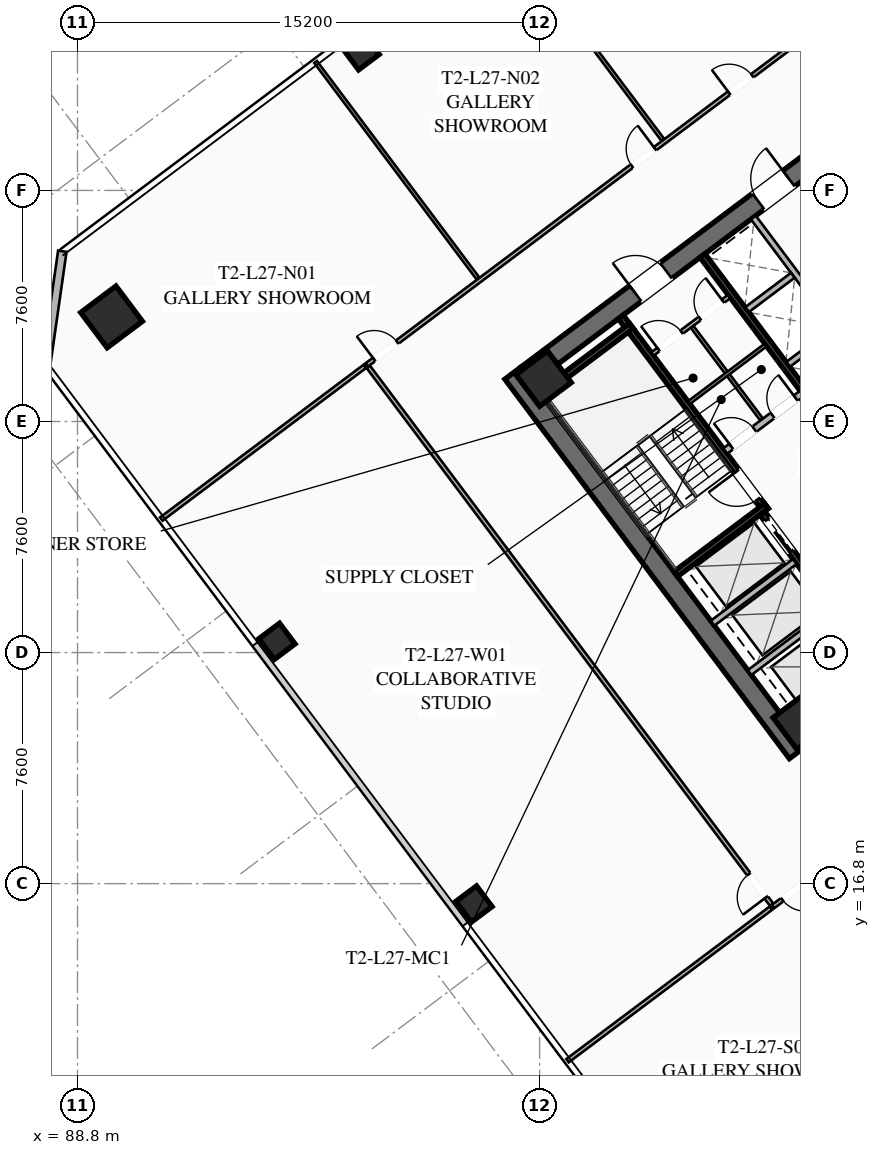
"""IFC4 building model, lengths in metres.
Left out: names, types, materials, properties, quantities, classifications, styles, units other than length and angle.
Written with IfcOpenShell. Run it as: python <this file> out.ifc"""

import sys

from ifc_helpers import new_model, si_unit, direction, frame, frame_2d, origin, origin_2d, place, context, subcontext, project, spatial, rectangle, hollow_rectangle, extrude, element, fill, save


model = new_model("IFC4")
c1 = context("Model", 3, precision=1e-05, world=origin(), true_north=direction((0.0, 1.0)))
c2 = subcontext(c1, "Body", "Model", "MODEL_VIEW")
j1 = project(units=[si_unit("LENGTHUNIT", "METRE"), si_unit("PLANEANGLEUNIT", "RADIAN")], contexts=[c1])
p1 = place(None, origin())
s1 = spatial("IfcSite", under=j1, at=p1, CompositionType="ELEMENT")
p2 = place(p1, origin())
s2 = spatial("IfcBuilding", under=s1, at=p2, CompositionType="ELEMENT")
p3 = place(p2, frame((0.0, 0.0, 102.7)))
s3 = spatial("IfcBuildingStorey", under=s2, at=p3, CompositionType="ELEMENT", Elevation=102.7)
p4 = place(p3, frame((112.476, 21.107, 0.0), z_axis=(0.0, 0.0, 1.0), x_axis=(-0.600005007985, 0.799996243986, 0.0)))
e1 = element("IfcWall", 1, at=p4, inside=s3, PredefinedType="SHEAR", context=c2, shape_type="SweptSolid", body=[
    extrude(rectangle(XDim=15.6, YDim=0.65, at=frame_2d((7.8, 0.0))), origin(), (0.0, 0.0, 1.0), 3.55),
])
p5 = place(p3, frame((124.429, 30.478, 0.0), z_axis=(0.0, 0.0, 1.0), x_axis=(-0.799998028465, -0.600002628705, 0.0)))
e2 = element("IfcWall", 2, at=p5, inside=s3, PredefinedType="SHEAR", context=c2, shape_type="SweptSolid", body=[
    extrude(rectangle(XDim=14.86, YDim=0.65, at=frame_2d((7.43, 0.0))), origin(), (0.0, 0.0, 1.0), 3.55),
])
p6 = place(p5, frame((9.13, 0.0, 0.0)))
e3 = element("IfcOpeningElement", 3, at=p6, cuts=e2, PredefinedType="OPENING", context=c2, shape_type="SweptSolid", body=[
    extrude(rectangle(XDim=1.25, YDim=2.25, at=frame_2d((0.625, 1.125))), frame((0.0, 0.335, 0.0), z_axis=(0.0, -1.0, 0.0), x_axis=(1.0, 0.0, 0.0)), (0.0, 0.0, 1.0), 0.67),
])
p7 = place(p5, frame((4.08, 0.0, 0.0)))
e4 = element("IfcOpeningElement", 4, at=p7, cuts=e2, PredefinedType="OPENING", context=c2, shape_type="SweptSolid", body=[
    extrude(rectangle(XDim=1.25, YDim=2.25, at=frame_2d((0.625, 1.125))), frame((0.0, 0.335, 0.0), z_axis=(0.0, -1.0, 0.0), x_axis=(1.0, 0.0, 0.0)), (0.0, 0.0, 1.0), 0.67),
])
p8 = place(p3, frame((103.571, 33.522, 0.0), z_axis=(0.0, 0.0, 1.0), x_axis=(0.799998028465, 0.600002628705, 0.0)))
e5 = element("IfcWall", 5, at=p8, inside=s3, PredefinedType="SHEAR", context=c2, shape_type="SweptSolid", body=[
    extrude(rectangle(XDim=14.86, YDim=0.65, at=frame_2d((7.43, 0.0))), origin(), (0.0, 0.0, 1.0), 3.55),
])
p9 = place(p8, frame((4.48, 0.0, 0.0)))
e6 = element("IfcOpeningElement", 6, at=p9, cuts=e5, PredefinedType="OPENING", context=c2, shape_type="SweptSolid", body=[
    extrude(rectangle(XDim=1.25, YDim=2.25, at=frame_2d((0.625, 1.125))), frame((0.0, 0.335, 0.0), z_axis=(0.0, -1.0, 0.0), x_axis=(1.0, 0.0, 0.0)), (0.0, 0.0, 1.0), 0.67),
])
p10 = place(p8, frame((9.53, 0.0, 0.0)))
e7 = element("IfcOpeningElement", 7, at=p10, cuts=e5, PredefinedType="OPENING", context=c2, shape_type="SweptSolid", body=[
    extrude(rectangle(XDim=1.25, YDim=2.25, at=frame_2d((0.625, 1.125))), frame((0.0, 0.335, 0.0), z_axis=(0.0, -1.0, 0.0), x_axis=(1.0, 0.0, 0.0)), (0.0, 0.0, 1.0), 0.67),
])
for number, where, z_axis, x_axis in (
    (8, (112.59, 22.13, 0.0), (0.0, 0.0, 1.0), (0.8, 0.6, 0.0)),
    (9, (104.13, 33.41, 0.0), (0.0, 0.0, 1.0), (0.8, 0.6, 0.0)),
):
    element("IfcColumn", number, at=place(p3, frame(where, z_axis=z_axis, x_axis=x_axis)), inside=s3, PredefinedType="COLUMN", context=c2, shape_type="SweptSolid", body=[
        extrude(hollow_rectangle(XDim=1.3, YDim=1.3, WallThickness=0.05, at=origin_2d()), origin(), (0.0, 0.0, 1.0), 3.35),
    ])
p11 = place(p3, frame((89.92, 35.44, 0.0), z_axis=(0.0, 0.0, 1.0), x_axis=(0.799999996291, 0.600000004945, 0.0)))
e10 = element("IfcColumn", 10, at=p11, inside=s3, PredefinedType="COLUMN", context=c2, shape_type="SweptSolid", body=[
    extrude(hollow_rectangle(XDim=1.45, YDim=1.45, WallThickness=0.055, at=origin_2d()), origin(), (0.0, 0.0, 1.0), 3.35),
])
for number, where, z_axis, x_axis in (
    (11, (98.13, 44.16, 0.0), (0.0, 0.0, 1.0), (0.8, 0.6, 0.0)),
    (12, (95.36, 24.77, 0.0), (0.0, 0.0, 1.0), (0.8, 0.6, 0.0)),
    (13, (101.84, 16.13, 0.0), (0.0, 0.0, 1.0), (0.8, 0.6, 0.0)),
):
    element("IfcColumn", number, at=place(p3, frame(where, z_axis=z_axis, x_axis=x_axis)), inside=s3, PredefinedType="COLUMN", context=c2, shape_type="SweptSolid", body=[
        extrude(hollow_rectangle(XDim=0.85, YDim=0.85, WallThickness=0.035, at=origin_2d()), origin(), (0.0, 0.0, 1.0), 3.35),
    ])
p12 = place(p3, frame((87.76, 33.82, 0.0), z_axis=(0.0, 0.0, 1.0), x_axis=(0.141430307517, 0.989948214866, 0.0)))
e14 = element("IfcWall", 14, at=p12, inside=s3, PredefinedType="SOLIDWALL", context=c2, shape_type="SweptSolid", body=[
    extrude(rectangle(XDim=3.818, YDim=0.28, at=frame_2d((1.909, 0.0))), origin(), (0.0, 0.0, 1.0), 3.35),
])
p13 = place(p3, frame((111.44, 29.08, 0.0), z_axis=(0.0, 0.0, 1.0), x_axis=(-0.600009827119, 0.799992629566, 0.0)))
e15 = element("IfcWall", 15, at=p13, inside=s3, PredefinedType="SHEAR", context=c2, shape_type="SweptSolid", body=[
    extrude(rectangle(XDim=7.95, YDim=0.2, at=frame_2d((3.975, 0.0))), origin(), (0.0, 0.0, 1.0), 3.35),
])
p14 = place(p13, frame((0.45, 0.0, 0.0)))
e16 = element("IfcOpeningElement", 16, at=p14, cuts=e15, PredefinedType="OPENING", context=c2, shape_type="SweptSolid", body=[
    extrude(rectangle(XDim=1.15, YDim=2.2, at=frame_2d((0.575, 1.1))), frame((0.0, 0.11, 0.0), z_axis=(0.0, -1.0, 0.0), x_axis=(1.0, 0.0, 0.0)), (0.0, 0.0, 1.0), 0.22),
])
for number, where, z_axis, x_axis in (
    (17, (108.476, 26.982, 0.0), (0.0, 0.0, 1.0), (0.8, 0.6, 0.0)),
    (18, (104.036, 32.902, 0.0), (0.0, 0.0, 1.0), (0.8, 0.6, 0.0)),
):
    element("IfcWall", number, at=place(p3, frame(where, z_axis=z_axis, x_axis=x_axis)), inside=s3, PredefinedType="SHEAR", context=c2, shape_type="SweptSolid", body=[
        extrude(rectangle(XDim=3.73, YDim=0.2, at=frame_2d((1.865, 0.0))), origin(), (0.0, 0.0, 1.0), 3.35),
    ])
p15 = place(p3, frame((117.938, 26.016, 0.0), z_axis=(0.0, 0.0, 1.0), x_axis=(-0.600005463273, 0.799995902516, 0.0)))
e19 = element("IfcWall", 19, at=p15, inside=s3, PredefinedType="SHEAR", context=c2, shape_type="SweptSolid", body=[
    extrude(rectangle(XDim=14.3, YDim=0.2, at=frame_2d((7.15, 0.0))), origin(), (0.0, 0.0, 1.0), 3.35),
])
p16 = place(p3, frame((110.104, 31.028, 0.0), z_axis=(0.0, 0.0, 1.0), x_axis=(0.800018601094, 0.59997519774, 0.0)))
e20 = element("IfcWall", 20, at=p16, inside=s3, PredefinedType="SOLIDWALL", context=c2, shape_type="SweptSolid", body=[
    extrude(rectangle(XDim=3.15, YDim=0.22, at=frame_2d((1.575, 0.0))), origin(), (0.0, 0.0, 1.0), 2.703),
])
p17 = place(p16, frame((0.25, 0.0, 0.0)))
e21 = element("IfcOpeningElement", 21, at=p17, cuts=e20, PredefinedType="OPENING", context=c2, shape_type="SweptSolid", body=[
    extrude(rectangle(XDim=0.95, YDim=2.05, at=frame_2d((0.475, 1.025))), frame((0.0, 0.12, 0.0), z_axis=(0.0, -1.0, 0.0), x_axis=(1.0, 0.0, 0.0)), (0.0, 0.0, 1.0), 0.24),
])
p18 = place(p16, frame((1.95, 0.0, 0.0)))
e22 = element("IfcOpeningElement", 22, at=p18, cuts=e20, PredefinedType="OPENING", context=c2, shape_type="SweptSolid", body=[
    extrude(rectangle(XDim=0.95, YDim=2.05, at=frame_2d((0.475, 1.025))), frame((0.0, 0.12, 0.0), z_axis=(0.0, -1.0, 0.0), x_axis=(1.0, 0.0, 0.0)), (0.0, 0.0, 1.0), 0.24),
])
p19 = place(p3, frame((115.13, 23.91, 0.0), z_axis=(0.0, 0.0, 1.0), x_axis=(-0.599975393228, 0.800018454488, 0.0)))
e23 = element("IfcWall", 23, at=p19, inside=s3, PredefinedType="SHEAR", context=c2, shape_type="SweptSolid", body=[
    extrude(rectangle(XDim=6.35, YDim=0.2, at=frame_2d((3.175, 0.0))), origin(), (0.0, 0.0, 1.0), 3.35),
])
p20 = place(p19, frame((4.775, 0.0, 0.0)))
e24 = element("IfcOpeningElement", 24, at=p20, cuts=e23, PredefinedType="OPENING", context=c2, shape_type="SweptSolid", body=[
    extrude(rectangle(XDim=1.3, YDim=2.25, at=frame_2d((0.65, 1.125))), frame((0.0, 0.11, 0.0), z_axis=(0.0, -1.0, 0.0), x_axis=(1.0, 0.0, 0.0)), (0.0, 0.0, 1.0), 0.22),
])
p21 = place(p19, frame((2.775, 0.0, 0.0)))
e25 = element("IfcOpeningElement", 25, at=p21, cuts=e23, PredefinedType="OPENING", context=c2, shape_type="SweptSolid", body=[
    extrude(rectangle(XDim=1.3, YDim=2.25, at=frame_2d((0.65, 1.125))), frame((0.0, 0.11, 0.0), z_axis=(0.0, -1.0, 0.0), x_axis=(1.0, 0.0, 0.0)), (0.0, 0.0, 1.0), 0.22),
])
p22 = place(p19, frame((0.575, 0.0, 0.0)))
e26 = element("IfcOpeningElement", 26, at=p22, cuts=e23, PredefinedType="OPENING", context=c2, shape_type="SweptSolid", body=[
    extrude(rectangle(XDim=1.3, YDim=2.25, at=frame_2d((0.65, 1.125))), frame((0.0, 0.11, 0.0), z_axis=(0.0, -1.0, 0.0), x_axis=(1.0, 0.0, 0.0)), (0.0, 0.0, 1.0), 0.22),
])
for number, where, z_axis, x_axis in (
    (27, (110.906, 23.742, 0.0), (0.0, 0.0, 1.0), (0.8, 0.6, 0.0)),
    (28, (109.688, 25.366, 0.0), (0.0, 0.0, 1.0), (0.8, 0.6, 0.0)),
):
    element("IfcWall", number, at=place(p3, frame(where, z_axis=z_axis, x_axis=x_axis)), inside=s3, PredefinedType="SOLIDWALL", context=c2, shape_type="SweptSolid", body=[
        extrude(rectangle(XDim=3.38, YDim=0.2, at=frame_2d((1.69, 0.0))), origin(), (0.0, 0.0, 1.0), 3.35),
    ])
p23 = place(p3, frame((107.71, 34.22, 0.0), z_axis=(0.0, 0.0, 1.0), x_axis=(0.799981399002, 0.60002480053, 0.0)))
e29 = element("IfcWall", 29, at=p23, inside=s3, PredefinedType="PARTITIONING", context=c2, shape_type="SweptSolid", body=[
    extrude(rectangle(XDim=3.15, YDim=0.135, at=frame_2d((1.575, 0.0))), origin(), (0.0, 0.0, 1.0), 2.703),
])
p24 = place(p23, frame((0.25, 0.0, 0.0)))
e30 = element("IfcOpeningElement", 30, at=p24, cuts=e29, PredefinedType="OPENING", context=c2, shape_type="SweptSolid", body=[
    extrude(rectangle(XDim=0.95, YDim=2.05, at=frame_2d((0.475, 1.025))), frame((0.0, 0.077, 0.0), z_axis=(0.0, -1.0, 0.0), x_axis=(1.0, 0.0, 0.0)), (0.0, 0.0, 1.0), 0.155),
])
p25 = place(p23, frame((1.95, 0.0, 0.0)))
e31 = element("IfcOpeningElement", 31, at=p25, cuts=e29, PredefinedType="OPENING", context=c2, shape_type="SweptSolid", body=[
    extrude(rectangle(XDim=0.95, YDim=2.05, at=frame_2d((0.475, 1.025))), frame((0.0, 0.077, 0.0), z_axis=(0.0, -1.0, 0.0), x_axis=(1.0, 0.0, 0.0)), (0.0, 0.0, 1.0), 0.155),
])
p26 = place(p3, frame((111.296, 32.072, 0.0), z_axis=(0.0, 0.0, 1.0), x_axis=(-0.59995887973, 0.800030838552, 0.0)))
e32 = element("IfcWall", 32, at=p26, inside=s3, PredefinedType="PARTITIONING", context=c2, shape_type="SweptSolid", body=[
    extrude(rectangle(XDim=3.8, YDim=0.11, at=frame_2d((1.9, 0.0))), origin(), (0.0, 0.0, 1.0), 2.703),
])
p27 = place(p3, frame((108.91, 32.62, 0.0), z_axis=(0.0, 0.0, 1.0), x_axis=(0.800018601094, 0.59997519774, 0.0)))
e33 = element("IfcWall", 33, at=p27, inside=s3, PredefinedType="PARTITIONING", context=c2, shape_type="SweptSolid", body=[
    extrude(rectangle(XDim=3.15, YDim=0.11, at=frame_2d((1.575, 0.0))), origin(), (0.0, 0.0, 1.0), 2.703),
])
p28 = place(p3, frame((115.11, 33.27, 0.0), z_axis=(0.0, 0.0, 1.0), x_axis=(-0.600011488909, 0.79999138319, 0.0)))
e34 = element("IfcWall", 34, at=p28, inside=s3, PredefinedType="SOLIDWALL", context=c2, shape_type="SweptSolid", body=[
    extrude(rectangle(XDim=6.8, YDim=0.2, at=frame_2d((3.4, 0.0))), origin(), (0.0, 0.0, 1.0), 3.35),
])
p29 = place(p3, frame((112.176, 33.882, 0.0), z_axis=(0.0, 0.0, 1.0), x_axis=(0.8, 0.6, 0.0)))
e35 = element("IfcWall", 35, at=p29, inside=s3, PredefinedType="SOLIDWALL", context=c2, shape_type="SweptSolid", body=[
    extrude(rectangle(XDim=1.88, YDim=0.2, at=frame_2d((0.94, 0.0))), origin(), (0.0, 0.0, 1.0), 3.35),
])
p30 = place(p3, frame((110.826, 35.682, 0.0), z_axis=(0.0, 0.0, 1.0), x_axis=(0.799984418148, 0.600020775241, 0.0)))
e36 = element("IfcWall", 36, at=p30, inside=s3, PredefinedType="SOLIDWALL", context=c2, shape_type="SweptSolid", body=[
    extrude(rectangle(XDim=1.88, YDim=0.2, at=frame_2d((0.94, 0.0))), origin(), (0.0, 0.0, 1.0), 3.35),
])
p31 = place(p3, frame((98.316, 33.862, 0.0), z_axis=(0.0, 0.0, 1.0), x_axis=(0.8000041147, 0.599994513695, 0.0)))
e37 = element("IfcWall", 37, at=p31, inside=s3, PredefinedType="PARTITIONING", context=c2, shape_type="SweptSolid", body=[
    extrude(rectangle(XDim=28.48, YDim=0.135, at=frame_2d((14.24, 0.0))), origin(), (0.0, 0.0, 1.0), 2.703),
])
p32 = place(p31, frame((0.3, 0.0, 0.0)))
e38 = element("IfcOpeningElement", 38, at=p32, cuts=e37, PredefinedType="OPENING", context=c2, shape_type="SweptSolid", body=[
    extrude(rectangle(XDim=0.95, YDim=2.05, at=frame_2d((0.475, 1.025))), frame((0.0, 0.077, 0.0), z_axis=(0.0, -1.0, 0.0), x_axis=(1.0, 0.0, 0.0)), (0.0, 0.0, 1.0), 0.155),
])
p33 = place(p31, frame((10.9, 0.0, 0.0)))
e39 = element("IfcOpeningElement", 39, at=p33, cuts=e37, PredefinedType="OPENING", context=c2, shape_type="SweptSolid", body=[
    extrude(rectangle(XDim=0.95, YDim=2.05, at=frame_2d((0.475, 1.025))), frame((0.0, 0.077, 0.0), z_axis=(0.0, -1.0, 0.0), x_axis=(1.0, 0.0, 0.0)), (0.0, 0.0, 1.0), 0.155),
])
p34 = place(p31, frame((14.9, 0.0, 0.0)))
e40 = element("IfcOpeningElement", 40, at=p34, cuts=e37, PredefinedType="OPENING", context=c2, shape_type="SweptSolid", body=[
    extrude(rectangle(XDim=0.95, YDim=2.05, at=frame_2d((0.475, 1.025))), frame((0.0, 0.077, 0.0), z_axis=(0.0, -1.0, 0.0), x_axis=(1.0, 0.0, 0.0)), (0.0, 0.0, 1.0), 0.155),
])
p35 = place(p31, frame((27.23, 0.0, 0.0)))
e41 = element("IfcOpeningElement", 41, at=p35, cuts=e37, PredefinedType="OPENING", context=c2, shape_type="SweptSolid", body=[
    extrude(rectangle(XDim=0.95, YDim=2.05, at=frame_2d((0.475, 1.025))), frame((0.0, 0.077, 0.0), z_axis=(0.0, -1.0, 0.0), x_axis=(1.0, 0.0, 0.0)), (0.0, 0.0, 1.0), 0.155),
])
p36 = place(p3, frame((101.972, 36.704, 0.0), z_axis=(0.0, 0.0, 1.0), x_axis=(-0.59999561085, 0.800003291844, 0.0)))
e42 = element("IfcWall", 42, at=p36, inside=s3, PredefinedType="PARTITIONING", context=c2, shape_type="SweptSolid", body=[
    extrude(rectangle(XDim=8.9, YDim=0.11, at=frame_2d((4.45, 0.0))), origin(), (0.0, 0.0, 1.0), 2.703),
])
p37 = place(p3, frame((108.052, 41.264, 0.0), z_axis=(0.0, 0.0, 1.0), x_axis=(-0.6, 0.8, 0.0)))
e43 = element("IfcWall", 43, at=p37, inside=s3, PredefinedType="PARTITIONING", context=c2, shape_type="SweptSolid", body=[
    extrude(rectangle(XDim=8.9, YDim=0.11, at=frame_2d((4.45, 0.0))), origin(), (0.0, 0.0, 1.0), 2.703),
])
p38 = place(p3, frame((134.462, 33.134, 0.0), z_axis=(0.0, 0.0, 1.0), x_axis=(-0.799996913945, -0.600004114717, 0.0)))
e44 = element("IfcWall", 44, at=p38, inside=s3, PredefinedType="PARTITIONING", context=c2, shape_type="SweptSolid", body=[
    extrude(rectangle(XDim=28.48, YDim=0.135, at=frame_2d((14.24, 0.0))), origin(), (0.0, 0.0, 1.0), 2.703),
])
p39 = place(p38, frame((27.15, 0.0, 0.0)))
e45 = element("IfcOpeningElement", 45, at=p39, cuts=e44, PredefinedType="OPENING", context=c2, shape_type="SweptSolid", body=[
    extrude(rectangle(XDim=0.95, YDim=2.05, at=frame_2d((0.475, 1.025))), frame((0.0, 0.077, 0.0), z_axis=(0.0, -1.0, 0.0), x_axis=(1.0, 0.0, 0.0)), (0.0, 0.0, 1.0), 0.155),
])
p40 = place(p38, frame((16.321, 0.0, 0.0)))
e46 = element("IfcOpeningElement", 46, at=p40, cuts=e44, PredefinedType="OPENING", context=c2, shape_type="SweptSolid", body=[
    extrude(rectangle(XDim=0.95, YDim=2.05, at=frame_2d((0.475, 1.025))), frame((0.0, 0.077, 0.0), z_axis=(0.0, -1.0, 0.0), x_axis=(1.0, 0.0, 0.0)), (0.0, 0.0, 1.0), 0.155),
])
p41 = place(p38, frame((12.529, 0.0, 0.0)))
e47 = element("IfcOpeningElement", 47, at=p41, cuts=e44, PredefinedType="OPENING", context=c2, shape_type="SweptSolid", body=[
    extrude(rectangle(XDim=0.95, YDim=2.05, at=frame_2d((0.475, 1.025))), frame((0.0, 0.077, 0.0), z_axis=(0.0, -1.0, 0.0), x_axis=(1.0, 0.0, 0.0)), (0.0, 0.0, 1.0), 0.155),
])
p42 = place(p38, frame((0.38, 0.0, 0.0)))
e48 = element("IfcOpeningElement", 48, at=p42, cuts=e44, PredefinedType="OPENING", context=c2, shape_type="SweptSolid", body=[
    extrude(rectangle(XDim=0.95, YDim=2.05, at=frame_2d((0.475, 1.025))), frame((0.0, 0.077, 0.0), z_axis=(0.0, -1.0, 0.0), x_axis=(1.0, 0.0, 0.0)), (0.0, 0.0, 1.0), 0.155),
])
p43 = place(p3, frame((111.63, 16.11, 0.0), z_axis=(0.0, 0.0, 1.0), x_axis=(-0.599996466511, 0.800002650104, 0.0)))
e49 = element("IfcWall", 49, at=p43, inside=s3, PredefinedType="PARTITIONING", context=c2, shape_type="SweptSolid", body=[
    extrude(rectangle(XDim=22.11, YDim=0.135, at=frame_2d((11.055, 0.0))), origin(), (0.0, 0.0, 1.0), 2.703),
])
p44 = place(p43, frame((0.3, 0.0, 0.0)))
e50 = element("IfcOpeningElement", 50, at=p44, cuts=e49, PredefinedType="OPENING", context=c2, shape_type="SweptSolid", body=[
    extrude(rectangle(XDim=0.95, YDim=2.05, at=frame_2d((0.475, 1.025))), frame((0.0, 0.077, 0.0), z_axis=(0.0, -1.0, 0.0), x_axis=(1.0, 0.0, 0.0)), (0.0, 0.0, 1.0), 0.155),
])
for number, where, z_axis, x_axis in (
    (51, (98.252, 33.814, 0.0), (0.0, 0.0, 1.0), (-0.8, -0.6, 0.0)),
    (52, (104.918, 10.976, 0.0), (0.0, 0.0, 1.0), (0.8, 0.6, 0.0)),
):
    element("IfcWall", number, at=place(p3, frame(where, z_axis=z_axis, x_axis=x_axis)), inside=s3, PredefinedType="PARTITIONING", context=c2, shape_type="SweptSolid", body=[
        extrude(rectangle(XDim=8.37, YDim=0.135, at=frame_2d((4.185, 0.0))), origin(), (0.0, 0.0, 1.0), 2.703),
    ])
p45 = place(p9, origin())
e53 = element("IfcDoor", 53, at=p45, inside=s3, OperationType="SINGLE_SWING_LEFT", PredefinedType="DOOR", context=c2, shape_type="SweptSolid", body=[
    extrude(rectangle(XDim=1.25, YDim=2.25, at=frame_2d((0.625, 1.125))), frame((0.0, 0.025, 0.0), z_axis=(0.0, -1.0, 0.0), x_axis=(1.0, 0.0, 0.0)), (0.0, 0.0, 1.0), 0.05),
])
fill(e6, e53)
p46 = place(p10, origin())
e54 = element("IfcDoor", 54, at=p46, inside=s3, OperationType="SINGLE_SWING_RIGHT", PredefinedType="DOOR", context=c2, shape_type="SweptSolid", body=[
    extrude(rectangle(XDim=1.25, YDim=2.25, at=frame_2d((0.625, 1.125))), frame((0.0, 0.025, 0.0), z_axis=(0.0, -1.0, 0.0), x_axis=(1.0, 0.0, 0.0)), (0.0, 0.0, 1.0), 0.05),
])
fill(e7, e54)
p47 = place(p14, origin())
e55 = element("IfcDoor", 55, at=p47, inside=s3, OperationType="SINGLE_SWING_RIGHT", PredefinedType="DOOR", context=c2, shape_type="SweptSolid", body=[
    extrude(rectangle(XDim=1.15, YDim=2.2, at=frame_2d((0.575, 1.1))), frame((0.0, 0.025, 0.0), z_axis=(0.0, -1.0, 0.0), x_axis=(1.0, 0.0, 0.0)), (0.0, 0.0, 1.0), 0.05),
])
fill(e16, e55)
p48 = place(p24, origin())
e56 = element("IfcDoor", 56, at=p48, inside=s3, OperationType="SINGLE_SWING_LEFT", PredefinedType="DOOR", context=c2, shape_type="SweptSolid", body=[
    extrude(rectangle(XDim=0.95, YDim=2.05, at=frame_2d((0.475, 1.025))), frame((0.0, 0.025, 0.0), z_axis=(0.0, -1.0, 0.0), x_axis=(1.0, 0.0, 0.0)), (0.0, 0.0, 1.0), 0.05),
])
fill(e30, e56)
p49 = place(p25, origin())
e57 = element("IfcDoor", 57, at=p49, inside=s3, OperationType="SINGLE_SWING_RIGHT", PredefinedType="DOOR", context=c2, shape_type="SweptSolid", body=[
    extrude(rectangle(XDim=0.95, YDim=2.05, at=frame_2d((0.475, 1.025))), frame((0.0, 0.025, 0.0), z_axis=(0.0, -1.0, 0.0), x_axis=(1.0, 0.0, 0.0)), (0.0, 0.0, 1.0), 0.05),
])
fill(e31, e57)
p50 = place(p17, origin())
e58 = element("IfcDoor", 58, at=p50, inside=s3, OperationType="SINGLE_SWING_LEFT", PredefinedType="DOOR", context=c2, shape_type="SweptSolid", body=[
    extrude(rectangle(XDim=0.95, YDim=2.05, at=frame_2d((0.475, 1.025))), frame((0.0, 0.025, 0.0), z_axis=(0.0, -1.0, 0.0), x_axis=(1.0, 0.0, 0.0)), (0.0, 0.0, 1.0), 0.05),
])
fill(e21, e58)
p51 = place(p18, origin())
e59 = element("IfcDoor", 59, at=p51, inside=s3, OperationType="SINGLE_SWING_RIGHT", PredefinedType="DOOR", context=c2, shape_type="SweptSolid", body=[
    extrude(rectangle(XDim=0.95, YDim=2.05, at=frame_2d((0.475, 1.025))), frame((0.0, 0.025, 0.0), z_axis=(0.0, -1.0, 0.0), x_axis=(1.0, 0.0, 0.0)), (0.0, 0.0, 1.0), 0.05),
])
fill(e22, e59)
p52 = place(p32, origin())
e60 = element("IfcDoor", 60, at=p52, inside=s3, OperationType="SINGLE_SWING_LEFT", PredefinedType="DOOR", context=c2, shape_type="SweptSolid", body=[
    extrude(rectangle(XDim=0.95, YDim=2.05, at=frame_2d((0.475, 1.025))), frame((0.0, 0.025, 0.0), z_axis=(0.0, -1.0, 0.0), x_axis=(1.0, 0.0, 0.0)), (0.0, 0.0, 1.0), 0.05),
])
fill(e38, e60)
p53 = place(p33, origin())
e61 = element("IfcDoor", 61, at=p53, inside=s3, OperationType="SINGLE_SWING_RIGHT", PredefinedType="DOOR", context=c2, shape_type="SweptSolid", body=[
    extrude(rectangle(XDim=0.95, YDim=2.05, at=frame_2d((0.475, 1.025))), frame((0.0, 0.025, 0.0), z_axis=(0.0, -1.0, 0.0), x_axis=(1.0, 0.0, 0.0)), (0.0, 0.0, 1.0), 0.05),
])
fill(e39, e61)
p54 = place(p34, origin())
e62 = element("IfcDoor", 62, at=p54, inside=s3, OperationType="SINGLE_SWING_LEFT", PredefinedType="DOOR", context=c2, shape_type="SweptSolid", body=[
    extrude(rectangle(XDim=0.95, YDim=2.05, at=frame_2d((0.475, 1.025))), frame((0.0, 0.025, 0.0), z_axis=(0.0, -1.0, 0.0), x_axis=(1.0, 0.0, 0.0)), (0.0, 0.0, 1.0), 0.05),
])
fill(e40, e62)
p55 = place(p39, origin())
e63 = element("IfcDoor", 63, at=p55, inside=s3, OperationType="SINGLE_SWING_LEFT", PredefinedType="DOOR", context=c2, shape_type="SweptSolid", body=[
    extrude(rectangle(XDim=0.95, YDim=2.05, at=frame_2d((0.475, 1.025))), frame((0.0, 0.025, 0.0), z_axis=(0.0, -1.0, 0.0), x_axis=(1.0, 0.0, 0.0)), (0.0, 0.0, 1.0), 0.05),
])
fill(e45, e63)
p56 = place(p44, origin())
e64 = element("IfcDoor", 64, at=p56, inside=s3, OperationType="SINGLE_SWING_LEFT", PredefinedType="DOOR", context=c2, shape_type="SweptSolid", body=[
    extrude(rectangle(XDim=0.95, YDim=2.05, at=frame_2d((0.475, 1.025))), frame((0.0, 0.025, 0.0), z_axis=(0.0, -1.0, 0.0), x_axis=(1.0, 0.0, 0.0)), (0.0, 0.0, 1.0), 0.05),
])
fill(e50, e64)
p57 = place(p20, origin())
e65 = element("IfcDoor", 65, at=p57, inside=s3, OperationType="SLIDING_TO_LEFT", PredefinedType="DOOR", context=c2, shape_type="SweptSolid", body=[
    extrude(rectangle(XDim=1.3, YDim=2.25, at=frame_2d((0.65, 1.125))), frame((0.0, 0.025, 0.0), z_axis=(0.0, -1.0, 0.0), x_axis=(1.0, 0.0, 0.0)), (0.0, 0.0, 1.0), 0.05),
])
fill(e24, e65)
save(model, sys.argv[1])
